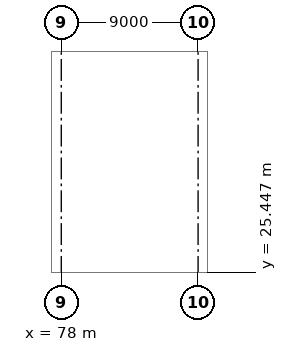
"""IFC4 building model, lengths in metres.
Left out: names, types, materials, properties, quantities, classifications, styles, units other than length and angle.
Written with IfcOpenShell. Run it as: python <this file> out.ifc"""

import sys

from ifc_helpers import new_model, si_unit, direction, frame, origin, origin_2d, place, context, subcontext, project, spatial, rectangle, extrude, element, save


model = new_model("IFC4")
c1 = context("Model", 3, precision=1e-05, world=origin(), true_north=direction((0.0, 1.0)))
c2 = subcontext(c1, "Body", "Model", "MODEL_VIEW")
j1 = project(units=[si_unit("LENGTHUNIT", "METRE"), si_unit("PLANEANGLEUNIT", "RADIAN")], contexts=[c1])
p1 = place(None, origin())
s1 = spatial("IfcSite", under=j1, at=p1, CompositionType="ELEMENT")
p2 = place(p1, origin())
s2 = spatial("IfcBuilding", under=s1, at=p2, CompositionType="ELEMENT")
p3 = place(p2, origin())
s3 = spatial("IfcBuildingStorey", under=s2, at=p3, CompositionType="ELEMENT", Elevation=0.0)
for number, where, z_axis, x_axis in (
    (1, (78.0, 33.7, -0.3), (0.0, 0.0, 1.0), (1.0, 0.0, 0.0)),
    (2, (87.0, 33.7, -0.3), (0.0, 0.0, 1.0), (1.0, 0.0, 0.0)),
):
    element("IfcColumn", number, at=place(p3, frame(where, z_axis=z_axis, x_axis=x_axis)), inside=s3, PredefinedType="COLUMN", context=c2, shape_type="SweptSolid", body=[
        extrude(rectangle(XDim=1.0, YDim=1.4, at=origin_2d()), origin(), (0.0, 0.0, 1.0), 5.3),
    ])
save(model, sys.argv[1])
